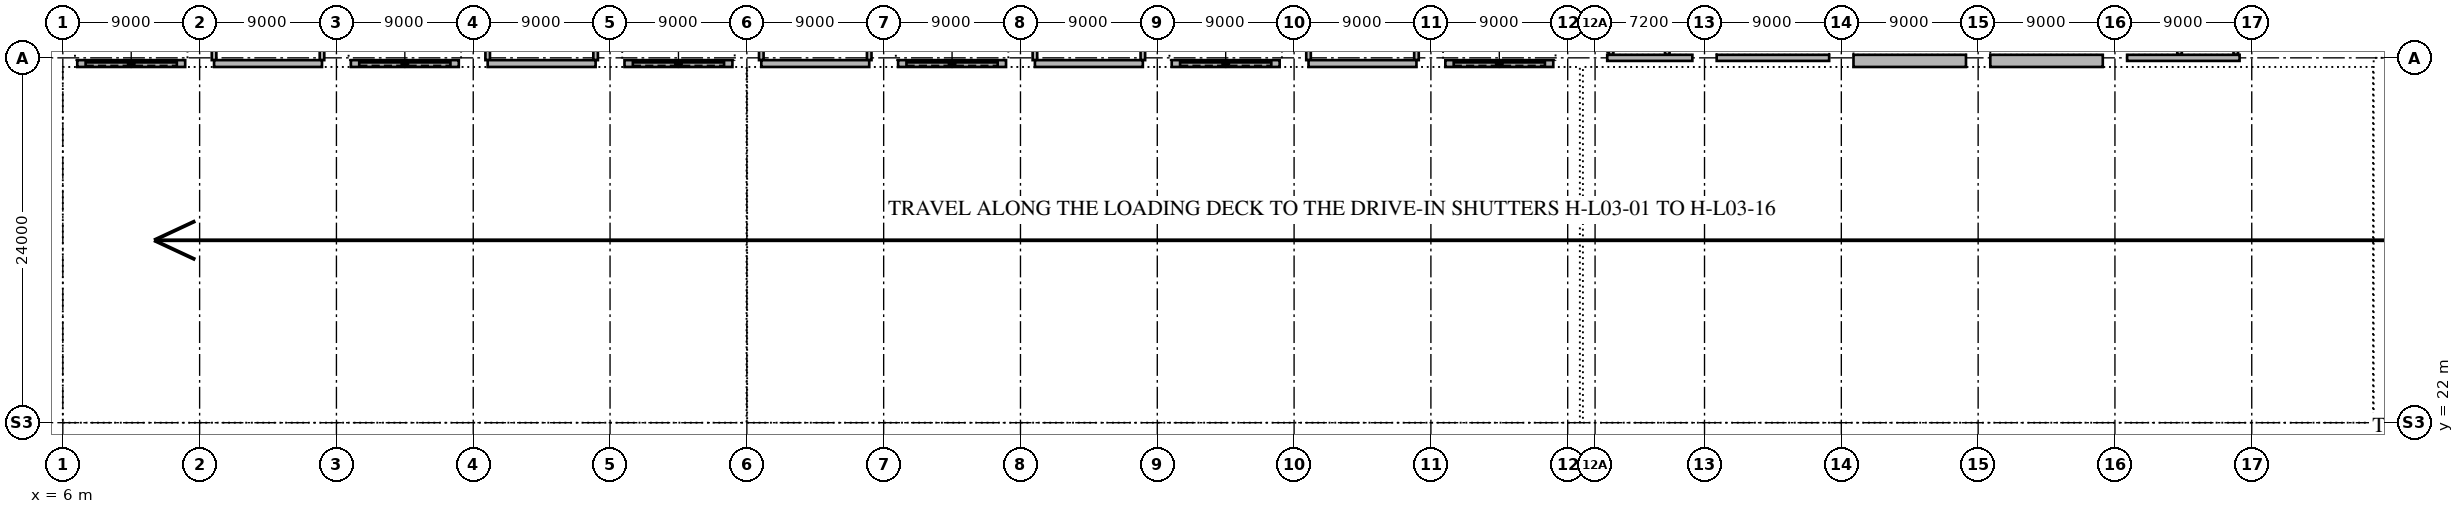
"""IFC4 building model, lengths in metres.
Left out: names, types, materials, properties, quantities, classifications, styles, units other than length and angle.
Written with IfcOpenShell. Run it as: python <this file> out.ifc"""

import sys

from ifc_helpers import new_model, si_unit, direction, frame, frame_2d, origin, origin_2d, place, context, subcontext, project, spatial, rectangle, extrude, element, fill, save


model = new_model("IFC4")
c1 = context("Model", 3, precision=1e-05, world=origin(), true_north=direction((0.0, 1.0)))
c2 = subcontext(c1, "Body", "Model", "MODEL_VIEW")
j1 = project(units=[si_unit("LENGTHUNIT", "METRE"), si_unit("PLANEANGLEUNIT", "RADIAN")], contexts=[c1])
p1 = place(None, origin())
s1 = spatial("IfcSite", under=j1, at=p1, CompositionType="ELEMENT")
p2 = place(p1, origin())
s2 = spatial("IfcBuilding", under=s1, at=p2, CompositionType="ELEMENT")
p3 = place(p2, frame((0.0, 0.0, 15.0)))
s3 = spatial("IfcBuildingStorey", under=s2, at=p3, CompositionType="ELEMENT", Elevation=15.0)
for number, where, z_axis, x_axis in (
    (1, (6.0, 46.0, 0.0), (0.0, 0.0, 1.0), (1.0, 0.0, 0.0)),
    (2, (15.0, 46.0, 0.0), (0.0, 0.0, 1.0), (1.0, 0.0, 0.0)),
    (3, (24.0, 46.0, 0.0), (0.0, 0.0, 1.0), (1.0, 0.0, 0.0)),
    (4, (33.0, 46.0, 0.0), (0.0, 0.0, 1.0), (1.0, 0.0, 0.0)),
    (5, (42.0, 46.0, 0.0), (0.0, 0.0, 1.0), (1.0, 0.0, 0.0)),
    (6, (51.0, 46.0, 0.0), (0.0, 0.0, 1.0), (1.0, 0.0, 0.0)),
    (7, (60.0, 46.0, 0.0), (0.0, 0.0, 1.0), (1.0, 0.0, 0.0)),
    (8, (69.0, 46.0, 0.0), (0.0, 0.0, 1.0), (1.0, 0.0, 0.0)),
    (9, (78.0, 46.0, 0.0), (0.0, 0.0, 1.0), (1.0, 0.0, 0.0)),
    (10, (87.0, 46.0, 0.0), (0.0, 0.0, 1.0), (1.0, 0.0, 0.0)),
    (11, (96.0, 46.0, 0.0), (0.0, 0.0, 1.0), (1.0, 0.0, 0.0)),
    (12, (105.0, 46.0, 0.0), (0.0, 0.0, 1.0), (1.0, 0.0, 0.0)),
):
    element("IfcColumn", number, at=place(p3, frame(where, z_axis=z_axis, x_axis=x_axis)), inside=s3, PredefinedType="COLUMN", context=c2, shape_type="SweptSolid", body=[
        extrude(rectangle(XDim=1.6, YDim=1.2, at=origin_2d()), origin(), (0.0, 0.0, 1.0), 4.2),
    ])
for number, where, z_axis, x_axis in (
    (13, (15.95, 45.85, 0.0), (0.0, 0.0, 1.0), (0.0, 1.0, 0.0)),
    (14, (23.05, 45.85, 0.0), (0.0, 0.0, 1.0), (0.0, 1.0, 0.0)),
    (15, (33.95, 45.85, 0.0), (0.0, 0.0, 1.0), (0.0, 1.0, 0.0)),
    (16, (41.05, 45.85, 0.0), (0.0, 0.0, 1.0), (0.0, 1.0, 0.0)),
    (17, (51.95, 45.85, 0.0), (0.0, 0.0, 1.0), (0.0, 1.0, 0.0)),
    (18, (59.05, 45.85, 0.0), (0.0, 0.0, 1.0), (0.0, 1.0, 0.0)),
    (19, (69.95, 45.85, 0.0), (0.0, 0.0, 1.0), (0.0, 1.0, 0.0)),
    (20, (77.05, 45.85, 0.0), (0.0, 0.0, 1.0), (0.0, 1.0, 0.0)),
    (21, (87.95, 45.85, 0.0), (0.0, 0.0, 1.0), (0.0, 1.0, 0.0)),
    (22, (95.05, 45.85, 0.0), (0.0, 0.0, 1.0), (0.0, 1.0, 0.0)),
):
    element("IfcWall", number, at=place(p3, frame(where, z_axis=z_axis, x_axis=x_axis)), inside=s3, PredefinedType="SHEAR", context=c2, shape_type="SweptSolid", body=[
        extrude(rectangle(XDim=10.2, YDim=0.3, at=frame_2d((5.1, 0.0))), origin(), (0.0, 0.0, 1.0), 3.9),
    ])
for number, where, z_axis, x_axis in (
    (23, (106.8, 46.0, 0.0), (0.0, 0.0, 1.0), (1.0, 0.0, 0.0)),
    (24, (114.0, 46.0, 0.0), (0.0, 0.0, 1.0), (1.0, 0.0, 0.0)),
    (25, (123.0, 46.0, 0.0), (0.0, 0.0, 1.0), (1.0, 0.0, 0.0)),
    (26, (132.0, 46.0, 0.0), (0.0, 0.0, 1.0), (1.0, 0.0, 0.0)),
    (27, (141.0, 46.0, 0.0), (0.0, 0.0, 1.0), (1.0, 0.0, 0.0)),
    (28, (150.0, 46.0, 0.0), (0.0, 0.0, 1.0), (1.0, 0.0, 0.0)),
):
    element("IfcColumn", number, at=place(p3, frame(where, z_axis=z_axis, x_axis=x_axis)), inside=s3, PredefinedType="COLUMN", context=c2, shape_type="SweptSolid", body=[
        extrude(rectangle(XDim=1.6, YDim=1.2, at=origin_2d()), origin(), (0.0, 0.0, 1.0), 4.2),
    ])
p4 = place(p3, frame((107.85, 46.2, 0.0), z_axis=(0.0, 0.0, 1.0), x_axis=(0.0, 1.0, 0.0)))
e29 = element("IfcWall", 29, at=p4, inside=s3, PredefinedType="SHEAR", context=c2, shape_type="SweptSolid", body=[
    extrude(rectangle(XDim=8.3, YDim=0.3, at=frame_2d((4.15, 0.0))), origin(), (0.0, 0.0, 1.0), 4.2),
])
p5 = place(p3, frame((111.55, 46.2, 0.0), z_axis=(0.0, 0.0, 1.0), x_axis=(0.0, 1.0, 0.0)))
e30 = element("IfcWall", 30, at=p5, inside=s3, PredefinedType="SHEAR", context=c2, shape_type="SweptSolid", body=[
    extrude(rectangle(XDim=8.3, YDim=0.3, at=frame_2d((4.15, 0.0))), origin(), (0.0, 0.0, 1.0), 4.2),
])
p6 = place(p5, frame((0.085, 0.0, 0.0)))
e31 = element("IfcOpeningElement", 31, at=p6, cuts=e30, PredefinedType="OPENING", context=c2, shape_type="SweptSolid", body=[
    extrude(rectangle(XDim=1.45, YDim=2.1, at=frame_2d((0.725, 1.05))), frame((0.0, 0.16, 0.0), z_axis=(0.0, -1.0, 0.0), x_axis=(1.0, 0.0, 0.0)), (0.0, 0.0, 1.0), 0.32),
])
p7 = place(p3, frame((145.25, 46.2, 0.0), z_axis=(0.0, 0.0, 1.0), x_axis=(0.0, 1.0, 0.0)))
e32 = element("IfcWall", 32, at=p7, inside=s3, PredefinedType="SHEAR", context=c2, shape_type="SweptSolid", body=[
    extrude(rectangle(XDim=8.3, YDim=0.3, at=frame_2d((4.15, 0.0))), origin(), (0.0, 0.0, 1.0), 4.2),
])
p8 = place(p7, frame((0.085, 0.0, 0.0)))
e33 = element("IfcOpeningElement", 33, at=p8, cuts=e32, PredefinedType="OPENING", context=c2, shape_type="SweptSolid", body=[
    extrude(rectangle(XDim=1.45, YDim=2.1, at=frame_2d((0.725, 1.05))), frame((0.0, 0.16, 0.0), z_axis=(0.0, -1.0, 0.0), x_axis=(1.0, 0.0, 0.0)), (0.0, 0.0, 1.0), 0.32),
])
p9 = place(p3, frame((148.95, 46.2, 0.0), z_axis=(0.0, 0.0, 1.0), x_axis=(0.0, 1.0, 0.0)))
e34 = element("IfcWall", 34, at=p9, inside=s3, PredefinedType="SHEAR", context=c2, shape_type="SweptSolid", body=[
    extrude(rectangle(XDim=8.3, YDim=0.3, at=frame_2d((4.15, 0.0))), origin(), (0.0, 0.0, 1.0), 4.2),
])
p10 = place(p3, frame((6.95, 45.625, 0.0), z_axis=(0.0, 0.0, 1.0), x_axis=(1.0, 0.0, 0.0)))
e35 = element("IfcWall", 35, at=p10, inside=s3, PredefinedType="SOLIDWALL", context=c2, shape_type="SweptSolid", body=[
    extrude(rectangle(XDim=7.1, YDim=0.45, at=frame_2d((3.55, 0.0))), origin(), (0.0, 0.0, 1.0), 4.2),
])
p11 = place(p10, frame((0.55, 0.0, 0.0)))
e36 = element("IfcOpeningElement", 36, at=p11, cuts=e35, PredefinedType="OPENING", context=c2, shape_type="SweptSolid", body=[
    extrude(rectangle(XDim=6.0, YDim=4.0, at=frame_2d((3.0, 2.0))), frame((0.0, 0.235, 0.0), z_axis=(0.0, -1.0, 0.0), x_axis=(1.0, 0.0, 0.0)), (0.0, 0.0, 1.0), 0.47),
])
p12 = place(p3, frame((15.95, 45.625, 0.0), z_axis=(0.0, 0.0, 1.0), x_axis=(1.0, 0.0, 0.0)))
e37 = element("IfcWall", 37, at=p12, inside=s3, PredefinedType="SOLIDWALL", context=c2, shape_type="SweptSolid", body=[
    extrude(rectangle(XDim=7.1, YDim=0.45, at=frame_2d((3.55, 0.0))), origin(), (0.0, 0.0, 1.0), 4.2),
])
p13 = place(p3, frame((24.95, 45.625, 0.0), z_axis=(0.0, 0.0, 1.0), x_axis=(1.0, 0.0, 0.0)))
e38 = element("IfcWall", 38, at=p13, inside=s3, PredefinedType="SOLIDWALL", context=c2, shape_type="SweptSolid", body=[
    extrude(rectangle(XDim=7.1, YDim=0.45, at=frame_2d((3.55, 0.0))), origin(), (0.0, 0.0, 1.0), 4.2),
])
p14 = place(p13, frame((0.55, 0.0, 0.0)))
e39 = element("IfcOpeningElement", 39, at=p14, cuts=e38, PredefinedType="OPENING", context=c2, shape_type="SweptSolid", body=[
    extrude(rectangle(XDim=6.0, YDim=4.0, at=frame_2d((3.0, 2.0))), frame((0.0, 0.235, 0.0), z_axis=(0.0, -1.0, 0.0), x_axis=(1.0, 0.0, 0.0)), (0.0, 0.0, 1.0), 0.47),
])
p15 = place(p3, frame((33.95, 45.625, 0.0), z_axis=(0.0, 0.0, 1.0), x_axis=(1.0, 0.0, 0.0)))
e40 = element("IfcWall", 40, at=p15, inside=s3, PredefinedType="SOLIDWALL", context=c2, shape_type="SweptSolid", body=[
    extrude(rectangle(XDim=7.1, YDim=0.45, at=frame_2d((3.55, 0.0))), origin(), (0.0, 0.0, 1.0), 4.2),
])
p16 = place(p3, frame((42.95, 45.625, 0.0), z_axis=(0.0, 0.0, 1.0), x_axis=(1.0, 0.0, 0.0)))
e41 = element("IfcWall", 41, at=p16, inside=s3, PredefinedType="SOLIDWALL", context=c2, shape_type="SweptSolid", body=[
    extrude(rectangle(XDim=7.1, YDim=0.45, at=frame_2d((3.55, 0.0))), origin(), (0.0, 0.0, 1.0), 4.2),
])
p17 = place(p16, frame((0.55, 0.0, 0.0)))
e42 = element("IfcOpeningElement", 42, at=p17, cuts=e41, PredefinedType="OPENING", context=c2, shape_type="SweptSolid", body=[
    extrude(rectangle(XDim=6.0, YDim=4.0, at=frame_2d((3.0, 2.0))), frame((0.0, 0.235, 0.0), z_axis=(0.0, -1.0, 0.0), x_axis=(1.0, 0.0, 0.0)), (0.0, 0.0, 1.0), 0.47),
])
p18 = place(p3, frame((51.95, 45.625, 0.0), z_axis=(0.0, 0.0, 1.0), x_axis=(1.0, 0.0, 0.0)))
e43 = element("IfcWall", 43, at=p18, inside=s3, PredefinedType="SOLIDWALL", context=c2, shape_type="SweptSolid", body=[
    extrude(rectangle(XDim=7.1, YDim=0.45, at=frame_2d((3.55, 0.0))), origin(), (0.0, 0.0, 1.0), 4.2),
])
p19 = place(p3, frame((60.95, 45.625, 0.0), z_axis=(0.0, 0.0, 1.0), x_axis=(1.0, 0.0, 0.0)))
e44 = element("IfcWall", 44, at=p19, inside=s3, PredefinedType="SOLIDWALL", context=c2, shape_type="SweptSolid", body=[
    extrude(rectangle(XDim=7.1, YDim=0.45, at=frame_2d((3.55, 0.0))), origin(), (0.0, 0.0, 1.0), 4.2),
])
p20 = place(p19, frame((0.55, 0.0, 0.0)))
e45 = element("IfcOpeningElement", 45, at=p20, cuts=e44, PredefinedType="OPENING", context=c2, shape_type="SweptSolid", body=[
    extrude(rectangle(XDim=6.0, YDim=4.0, at=frame_2d((3.0, 2.0))), frame((0.0, 0.235, 0.0), z_axis=(0.0, -1.0, 0.0), x_axis=(1.0, 0.0, 0.0)), (0.0, 0.0, 1.0), 0.47),
])
p21 = place(p3, frame((69.95, 45.625, 0.0), z_axis=(0.0, 0.0, 1.0), x_axis=(1.0, 0.0, 0.0)))
e46 = element("IfcWall", 46, at=p21, inside=s3, PredefinedType="SOLIDWALL", context=c2, shape_type="SweptSolid", body=[
    extrude(rectangle(XDim=7.1, YDim=0.45, at=frame_2d((3.55, 0.0))), origin(), (0.0, 0.0, 1.0), 4.2),
])
p22 = place(p3, frame((78.95, 45.625, 0.0), z_axis=(0.0, 0.0, 1.0), x_axis=(1.0, 0.0, 0.0)))
e47 = element("IfcWall", 47, at=p22, inside=s3, PredefinedType="SOLIDWALL", context=c2, shape_type="SweptSolid", body=[
    extrude(rectangle(XDim=7.1, YDim=0.45, at=frame_2d((3.55, 0.0))), origin(), (0.0, 0.0, 1.0), 4.2),
])
p23 = place(p22, frame((0.55, 0.0, 0.0)))
e48 = element("IfcOpeningElement", 48, at=p23, cuts=e47, PredefinedType="OPENING", context=c2, shape_type="SweptSolid", body=[
    extrude(rectangle(XDim=6.0, YDim=4.0, at=frame_2d((3.0, 2.0))), frame((0.0, 0.235, 0.0), z_axis=(0.0, -1.0, 0.0), x_axis=(1.0, 0.0, 0.0)), (0.0, 0.0, 1.0), 0.47),
])
p24 = place(p3, frame((87.95, 45.625, 0.0), z_axis=(0.0, 0.0, 1.0), x_axis=(1.0, 0.0, 0.0)))
e49 = element("IfcWall", 49, at=p24, inside=s3, PredefinedType="SOLIDWALL", context=c2, shape_type="SweptSolid", body=[
    extrude(rectangle(XDim=7.1, YDim=0.45, at=frame_2d((3.55, 0.0))), origin(), (0.0, 0.0, 1.0), 4.2),
])
p25 = place(p3, frame((96.95, 45.625, 0.0), z_axis=(0.0, 0.0, 1.0), x_axis=(1.0, 0.0, 0.0)))
e50 = element("IfcWall", 50, at=p25, inside=s3, PredefinedType="SOLIDWALL", context=c2, shape_type="SweptSolid", body=[
    extrude(rectangle(XDim=7.1, YDim=0.45, at=frame_2d((3.55, 0.0))), origin(), (0.0, 0.0, 1.0), 4.2),
])
p26 = place(p25, frame((0.55, 0.0, 0.0)))
e51 = element("IfcOpeningElement", 51, at=p26, cuts=e50, PredefinedType="OPENING", context=c2, shape_type="SweptSolid", body=[
    extrude(rectangle(XDim=6.0, YDim=4.0, at=frame_2d((3.0, 2.0))), frame((0.0, 0.235, 0.0), z_axis=(0.0, -1.0, 0.0), x_axis=(1.0, 0.0, 0.0)), (0.0, 0.0, 1.0), 0.47),
])
p27 = place(p3, frame((107.6, 46.0, 0.0), z_axis=(0.0, 0.0, 1.0), x_axis=(1.0, 0.0, 0.0)))
e52 = element("IfcWall", 52, at=p27, inside=s3, PredefinedType="SOLIDWALL", context=c2, shape_type="SweptSolid", body=[
    extrude(rectangle(XDim=5.6, YDim=0.4, at=frame_2d((2.8, 0.0))), origin(), (0.0, 0.0, 1.0), 4.2),
])
p28 = place(p27, frame((0.9, 0.0, 1.2)))
e53 = element("IfcOpeningElement", 53, at=p28, cuts=e52, PredefinedType="OPENING", context=c2, shape_type="SweptSolid", body=[
    extrude(rectangle(XDim=2.4, YDim=1.8, at=frame_2d((1.2, 0.9))), frame((0.0, 0.21, 0.0), z_axis=(0.0, -1.0, 0.0), x_axis=(1.0, 0.0, 0.0)), (0.0, 0.0, 1.0), 0.42),
])
p29 = place(p3, frame((114.8, 46.0, 0.0), z_axis=(0.0, 0.0, 1.0), x_axis=(1.0, 0.0, 0.0)))
e54 = element("IfcWall", 54, at=p29, inside=s3, PredefinedType="SOLIDWALL", context=c2, shape_type="SweptSolid", body=[
    extrude(rectangle(XDim=7.4, YDim=0.4, at=frame_2d((3.7, 0.0))), origin(), (0.0, 0.0, 1.0), 4.2),
])
p30 = place(p29, frame((1.7, 0.0, 0.6)))
e55 = element("IfcOpeningElement", 55, at=p30, cuts=e54, PredefinedType="OPENING", context=c2, shape_type="SweptSolid", body=[
    extrude(rectangle(XDim=4.0, YDim=2.4, at=frame_2d((2.0, 1.2))), frame((0.0, 0.21, 0.0), z_axis=(0.0, -1.0, 0.0), x_axis=(1.0, 0.0, 0.0)), (0.0, 0.0, 1.0), 0.42),
])
p31 = place(p3, frame((123.8, 45.8, 0.0), z_axis=(0.0, 0.0, 1.0), x_axis=(1.0, 0.0, 0.0)))
e56 = element("IfcWall", 56, at=p31, inside=s3, PredefinedType="SOLIDWALL", context=c2, shape_type="SweptSolid", body=[
    extrude(rectangle(XDim=7.4, YDim=0.8, at=frame_2d((3.7, 0.0))), origin(), (0.0, 0.0, 1.0), 3.6),
])
p32 = place(p31, frame((1.45, 0.0, 0.0)))
e57 = element("IfcOpeningElement", 57, at=p32, cuts=e56, PredefinedType="OPENING", context=c2, shape_type="SweptSolid", body=[
    extrude(rectangle(XDim=4.5, YDim=3.5, at=frame_2d((2.25, 1.75))), frame((0.0, 0.41, 0.0), z_axis=(0.0, -1.0, 0.0), x_axis=(1.0, 0.0, 0.0)), (0.0, 0.0, 1.0), 0.82),
])
p33 = place(p3, frame((132.8, 45.8, 0.0), z_axis=(0.0, 0.0, 1.0), x_axis=(1.0, 0.0, 0.0)))
e58 = element("IfcWall", 58, at=p33, inside=s3, PredefinedType="SOLIDWALL", context=c2, shape_type="SweptSolid", body=[
    extrude(rectangle(XDim=7.4, YDim=0.8, at=frame_2d((3.7, 0.0))), origin(), (0.0, 0.0, 1.0), 3.6),
])
p34 = place(p33, frame((2.525, 0.0, 0.0)))
e59 = element("IfcOpeningElement", 59, at=p34, cuts=e58, PredefinedType="OPENING", context=c2, shape_type="SweptSolid", body=[
    extrude(rectangle(XDim=2.35, YDim=2.4, at=frame_2d((1.175, 1.2))), frame((0.0, 0.41, 0.0), z_axis=(0.0, -1.0, 0.0), x_axis=(1.0, 0.0, 0.0)), (0.0, 0.0, 1.0), 0.82),
])
p35 = place(p3, frame((141.8, 46.0, 0.0), z_axis=(0.0, 0.0, 1.0), x_axis=(1.0, 0.0, 0.0)))
e60 = element("IfcWall", 60, at=p35, inside=s3, PredefinedType="SOLIDWALL", context=c2, shape_type="SweptSolid", body=[
    extrude(rectangle(XDim=7.4, YDim=0.4, at=frame_2d((3.7, 0.0))), origin(), (0.0, 0.0, 1.0), 4.2),
])
p36 = place(p35, frame((4.1, 0.0, 1.2)))
e61 = element("IfcOpeningElement", 61, at=p36, cuts=e60, PredefinedType="OPENING", context=c2, shape_type="SweptSolid", body=[
    extrude(rectangle(XDim=2.4, YDim=1.8, at=frame_2d((1.2, 0.9))), frame((0.0, 0.21, 0.0), z_axis=(0.0, -1.0, 0.0), x_axis=(1.0, 0.0, 0.0)), (0.0, 0.0, 1.0), 0.42),
])
p37 = place(p35, frame((0.1, 0.0, 1.2)))
e62 = element("IfcOpeningElement", 62, at=p37, cuts=e60, PredefinedType="OPENING", context=c2, shape_type="SweptSolid", body=[
    extrude(rectangle(XDim=2.4, YDim=1.8, at=frame_2d((1.2, 0.9))), frame((0.0, 0.21, 0.0), z_axis=(0.0, -1.0, 0.0), x_axis=(1.0, 0.0, 0.0)), (0.0, 0.0, 1.0), 0.42),
])
p38 = place(p11, frame((6.0, 0.0, 0.0), z_axis=(0.0, 0.0, 1.0), x_axis=(-1.0, 0.0, 0.0)))
e63 = element("IfcDoor", 63, at=p38, inside=s3, OperationType="ROLLINGUP", PredefinedType="DOOR", context=c2, shape_type="SweptSolid", body=[
    extrude(rectangle(XDim=6.0, YDim=4.0, at=frame_2d((3.0, 2.0))), frame((0.0, 0.025, 0.0), z_axis=(0.0, -1.0, 0.0), x_axis=(1.0, 0.0, 0.0)), (0.0, 0.0, 1.0), 0.05),
])
fill(e36, e63)
p39 = place(p14, frame((6.0, 0.0, 0.0), z_axis=(0.0, 0.0, 1.0), x_axis=(-1.0, 0.0, 0.0)))
e64 = element("IfcDoor", 64, at=p39, inside=s3, OperationType="ROLLINGUP", PredefinedType="DOOR", context=c2, shape_type="SweptSolid", body=[
    extrude(rectangle(XDim=6.0, YDim=4.0, at=frame_2d((3.0, 2.0))), frame((0.0, 0.025, 0.0), z_axis=(0.0, -1.0, 0.0), x_axis=(1.0, 0.0, 0.0)), (0.0, 0.0, 1.0), 0.05),
])
fill(e39, e64)
p40 = place(p17, frame((6.0, 0.0, 0.0), z_axis=(0.0, 0.0, 1.0), x_axis=(-1.0, 0.0, 0.0)))
e65 = element("IfcDoor", 65, at=p40, inside=s3, OperationType="ROLLINGUP", PredefinedType="DOOR", context=c2, shape_type="SweptSolid", body=[
    extrude(rectangle(XDim=6.0, YDim=4.0, at=frame_2d((3.0, 2.0))), frame((0.0, 0.025, 0.0), z_axis=(0.0, -1.0, 0.0), x_axis=(1.0, 0.0, 0.0)), (0.0, 0.0, 1.0), 0.05),
])
fill(e42, e65)
p41 = place(p20, frame((6.0, 0.0, 0.0), z_axis=(0.0, 0.0, 1.0), x_axis=(-1.0, 0.0, 0.0)))
e66 = element("IfcDoor", 66, at=p41, inside=s3, OperationType="ROLLINGUP", PredefinedType="DOOR", context=c2, shape_type="SweptSolid", body=[
    extrude(rectangle(XDim=6.0, YDim=4.0, at=frame_2d((3.0, 2.0))), frame((0.0, 0.025, 0.0), z_axis=(0.0, -1.0, 0.0), x_axis=(1.0, 0.0, 0.0)), (0.0, 0.0, 1.0), 0.05),
])
fill(e45, e66)
p42 = place(p23, frame((6.0, 0.0, 0.0), z_axis=(0.0, 0.0, 1.0), x_axis=(-1.0, 0.0, 0.0)))
e67 = element("IfcDoor", 67, at=p42, inside=s3, OperationType="ROLLINGUP", PredefinedType="DOOR", context=c2, shape_type="SweptSolid", body=[
    extrude(rectangle(XDim=6.0, YDim=4.0, at=frame_2d((3.0, 2.0))), frame((0.0, 0.025, 0.0), z_axis=(0.0, -1.0, 0.0), x_axis=(1.0, 0.0, 0.0)), (0.0, 0.0, 1.0), 0.05),
])
fill(e48, e67)
p43 = place(p26, frame((6.0, 0.0, 0.0), z_axis=(0.0, 0.0, 1.0), x_axis=(-1.0, 0.0, 0.0)))
e68 = element("IfcDoor", 68, at=p43, inside=s3, OperationType="ROLLINGUP", PredefinedType="DOOR", context=c2, shape_type="SweptSolid", body=[
    extrude(rectangle(XDim=6.0, YDim=4.0, at=frame_2d((3.0, 2.0))), frame((0.0, 0.025, 0.0), z_axis=(0.0, -1.0, 0.0), x_axis=(1.0, 0.0, 0.0)), (0.0, 0.0, 1.0), 0.05),
])
fill(e51, e68)
p44 = place(p28, origin())
e69 = element("IfcWindow", 69, at=p44, inside=s3, PartitioningType="SINGLE_PANEL", PredefinedType="WINDOW", context=c2, shape_type="SweptSolid", body=[
    extrude(rectangle(XDim=2.4, YDim=1.8, at=frame_2d((1.2, 0.9))), frame((0.0, 0.03, 0.0), z_axis=(0.0, -1.0, 0.0), x_axis=(1.0, 0.0, 0.0)), (0.0, 0.0, 1.0), 0.06),
])
fill(e53, e69)
p45 = place(p36, origin())
e70 = element("IfcWindow", 70, at=p45, inside=s3, PartitioningType="SINGLE_PANEL", PredefinedType="WINDOW", context=c2, shape_type="SweptSolid", body=[
    extrude(rectangle(XDim=2.4, YDim=1.8, at=frame_2d((1.2, 0.9))), frame((0.0, 0.03, 0.0), z_axis=(0.0, -1.0, 0.0), x_axis=(1.0, 0.0, 0.0)), (0.0, 0.0, 1.0), 0.06),
])
fill(e61, e70)
p46 = place(p37, origin())
e71 = element("IfcWindow", 71, at=p46, inside=s3, PartitioningType="SINGLE_PANEL", PredefinedType="WINDOW", context=c2, shape_type="SweptSolid", body=[
    extrude(rectangle(XDim=2.4, YDim=1.8, at=frame_2d((1.2, 0.9))), frame((0.0, 0.03, 0.0), z_axis=(0.0, -1.0, 0.0), x_axis=(1.0, 0.0, 0.0)), (0.0, 0.0, 1.0), 0.06),
])
fill(e62, e71)
p47 = place(p30, origin())
e72 = element("IfcWindow", 72, at=p47, inside=s3, PartitioningType="SINGLE_PANEL", PredefinedType="USERDEFINED", context=c2, shape_type="SweptSolid", body=[
    extrude(rectangle(XDim=4.0, YDim=2.4, at=frame_2d((2.0, 1.2))), frame((0.0, 0.03, 0.0), z_axis=(0.0, -1.0, 0.0), x_axis=(1.0, 0.0, 0.0)), (0.0, 0.0, 1.0), 0.06),
])
fill(e55, e72)
p48 = place(p32, frame((4.5, 0.0, 0.0), z_axis=(0.0, 0.0, 1.0), x_axis=(-1.0, 0.0, 0.0)))
e73 = element("IfcDoor", 73, at=p48, inside=s3, OperationType="ROLLINGUP", PredefinedType="DOOR", context=c2, shape_type="SweptSolid", body=[
    extrude(rectangle(XDim=4.5, YDim=3.5, at=frame_2d((2.25, 1.75))), frame((0.0, 0.025, 0.0), z_axis=(0.0, -1.0, 0.0), x_axis=(1.0, 0.0, 0.0)), (0.0, 0.0, 1.0), 0.05),
])
fill(e57, e73)
p49 = place(p34, frame((2.35, 0.0, 0.0), z_axis=(0.0, 0.0, 1.0), x_axis=(-1.0, 0.0, 0.0)))
e74 = element("IfcDoor", 74, at=p49, inside=s3, OperationType="DOUBLE_DOOR_SINGLE_SWING", PredefinedType="DOOR", context=c2, shape_type="SweptSolid", body=[
    extrude(rectangle(XDim=2.35, YDim=2.4, at=frame_2d((1.175, 1.2))), frame((0.0, 0.025, 0.0), z_axis=(0.0, -1.0, 0.0), x_axis=(1.0, 0.0, 0.0)), (0.0, 0.0, 1.0), 0.05),
])
fill(e59, e74)
p50 = place(p6, origin())
e75 = element("IfcDoor", 75, at=p50, inside=s3, OperationType="SINGLE_SWING_LEFT", PredefinedType="DOOR", context=c2, shape_type="SweptSolid", body=[
    extrude(rectangle(XDim=1.45, YDim=2.1, at=frame_2d((0.725, 1.05))), frame((0.0, 0.025, 0.0), z_axis=(0.0, -1.0, 0.0), x_axis=(1.0, 0.0, 0.0)), (0.0, 0.0, 1.0), 0.05),
])
fill(e31, e75)
p51 = place(p8, frame((1.45, 0.0, 0.0), z_axis=(0.0, 0.0, 1.0), x_axis=(-1.0, 0.0, 0.0)))
e76 = element("IfcDoor", 76, at=p51, inside=s3, OperationType="SINGLE_SWING_RIGHT", PredefinedType="DOOR", context=c2, shape_type="SweptSolid", body=[
    extrude(rectangle(XDim=1.45, YDim=2.1, at=frame_2d((0.725, 1.05))), frame((0.0, 0.025, 0.0), z_axis=(0.0, -1.0, 0.0), x_axis=(1.0, 0.0, 0.0)), (0.0, 0.0, 1.0), 0.05),
])
fill(e33, e76)
save(model, sys.argv[1])
